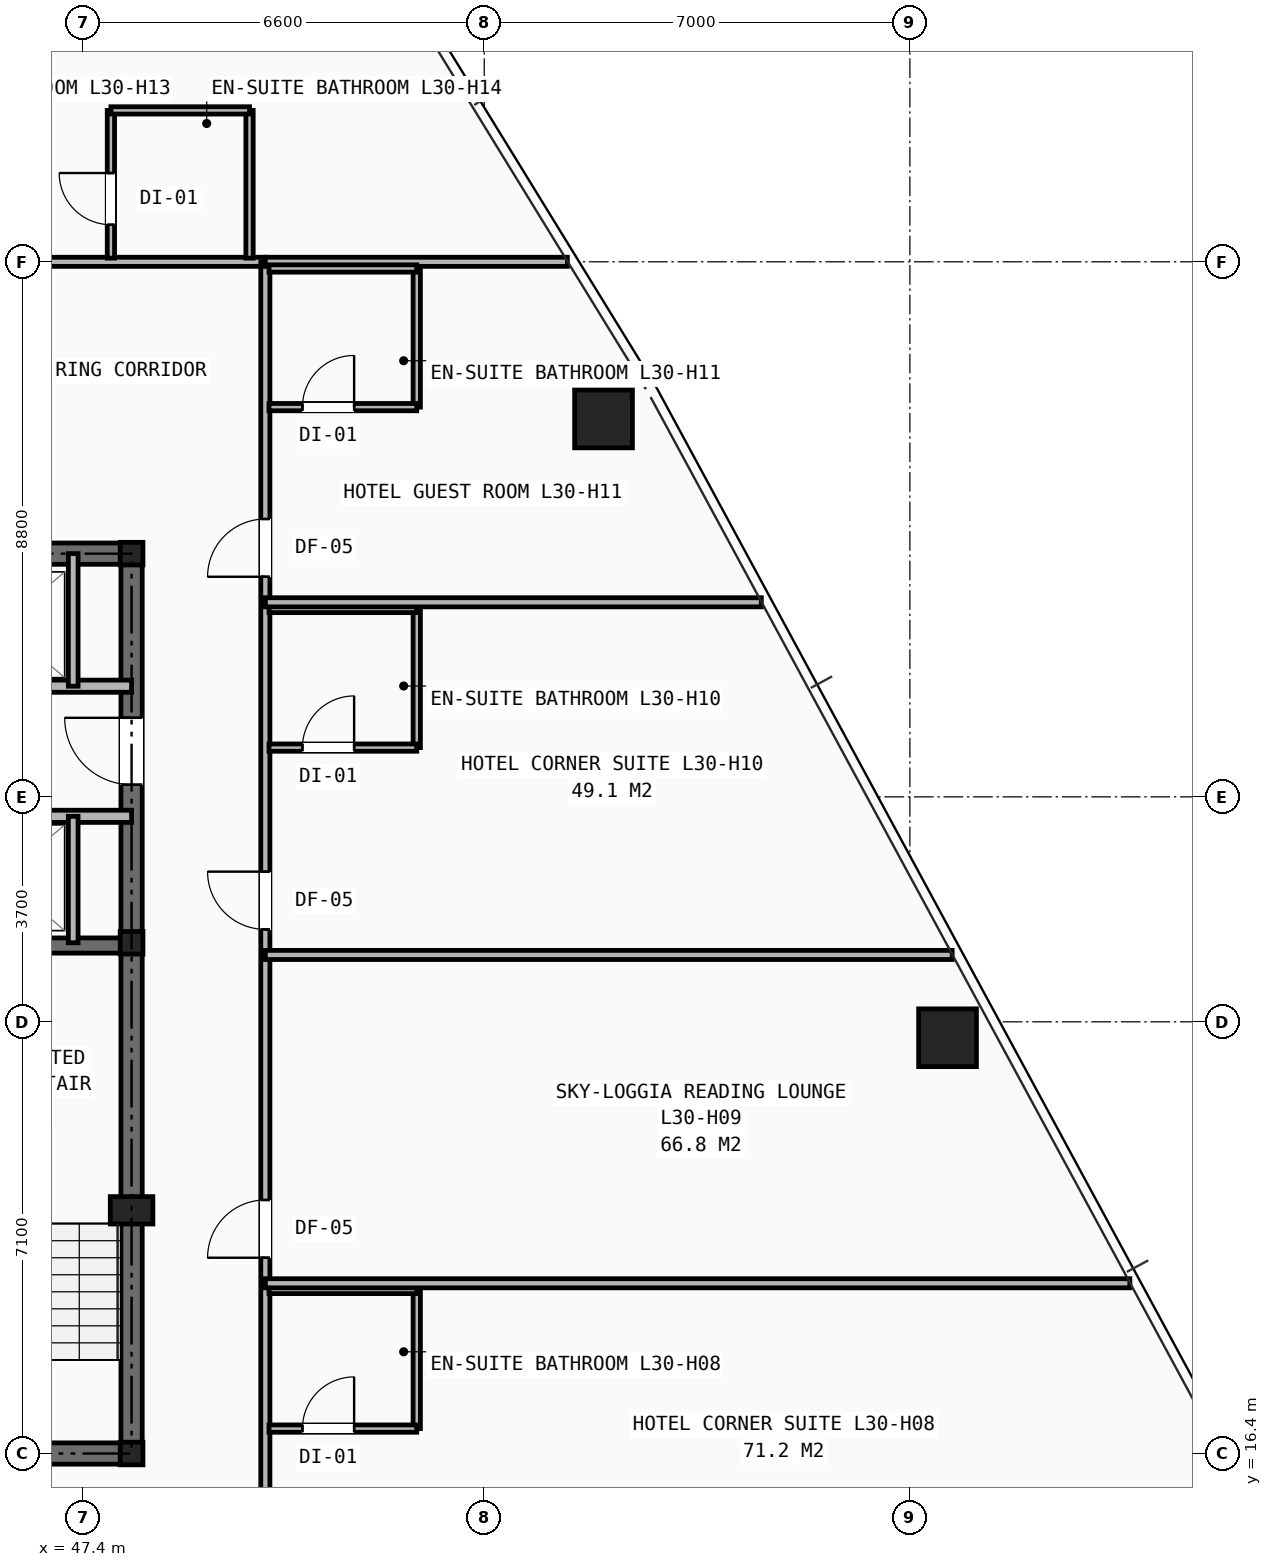
"""IFC4 building model, lengths in metres.
Left out: names, types, materials, properties, quantities, classifications, styles, units other than length and angle.
Written with IfcOpenShell. Run it as: python <this file> out.ifc"""

import sys

from ifc_helpers import new_model, si_unit, direction, frame, frame_2d, origin, origin_2d, place, context, subcontext, project, spatial, rectangle, hollow_rectangle, i_section, extrude, element, fill, save


model = new_model("IFC4")
c1 = context("Model", 3, precision=1e-05, world=origin(), true_north=direction((0.0, 1.0)))
c2 = subcontext(c1, "Body", "Model", "MODEL_VIEW")
j1 = project(units=[si_unit("LENGTHUNIT", "METRE"), si_unit("PLANEANGLEUNIT", "RADIAN")], contexts=[c1])
p1 = place(None, origin())
s1 = spatial("IfcSite", under=j1, at=p1, CompositionType="ELEMENT")
p2 = place(p1, origin())
s2 = spatial("IfcBuilding", under=s1, at=p2, CompositionType="ELEMENT")
p3 = place(p2, frame((0.0, 0.0, 105.4)))
s3 = spatial("IfcBuildingStorey", under=s2, at=p3, CompositionType="ELEMENT", Elevation=105.4)
for number, where, z_axis, x_axis in (
    (1, (48.2, 16.4, 0.0), (0.0, 0.0, 1.0), (1.0, 0.0, 0.0)),
    (2, (48.2, 24.8, 0.0), (0.0, 0.0, 1.0), (1.0, 0.0, 0.0)),
    (3, (48.2, 31.2, 0.0), (0.0, 0.0, 1.0), (1.0, 0.0, 0.0)),
):
    element("IfcColumn", number, at=place(p3, frame(where, z_axis=z_axis, x_axis=x_axis)), inside=s3, PredefinedType="COLUMN", context=c2, shape_type="SweptSolid", body=[
        extrude(i_section(OverallWidth=0.374, OverallDepth=0.372, WebThickness=0.016, FlangeThickness=0.026, at=origin_2d()), origin(), (0.0, 0.0, 1.0), 3.2),
    ])
p4 = place(p3, frame((48.2, 20.4, 0.0), z_axis=(0.0, 0.0, 1.0), x_axis=(1.0, 0.0, 0.0)))
e4 = element("IfcColumn", 4, at=p4, inside=s3, PredefinedType="PILASTER", context=c2, shape_type="SweptSolid", body=[
    extrude(rectangle(XDim=0.7, YDim=0.45, at=origin_2d()), origin(), (0.0, 0.0, 1.0), 3.2),
])
for number, where, z_axis, x_axis in (
    (5, (61.619, 23.238, 0.0), (0.0, 0.0, 1.0), (1.0, 0.0, 0.0)),
    (6, (55.962, 33.416, 0.0), (0.0, 0.0, 1.0), (1.0, 0.0, 0.0)),
):
    element("IfcColumn", number, at=place(p3, frame(where, z_axis=z_axis, x_axis=x_axis)), inside=s3, PredefinedType="COLUMN", context=c2, shape_type="SweptSolid", body=[
        extrude(hollow_rectangle(XDim=0.95, YDim=0.95, WallThickness=0.065, at=origin_2d()), origin(), (0.0, 0.0, 1.0), 3.2),
    ])
p5 = place(p3, frame((31.8, 16.4, 0.0), z_axis=(0.0, 0.0, 1.0), x_axis=(1.0, 0.0, 0.0)))
e7 = element("IfcWall", 7, at=p5, inside=s3, PredefinedType="SHEAR", context=c2, shape_type="SweptSolid", body=[
    extrude(rectangle(XDim=16.4, YDim=0.35, at=frame_2d((8.2, 0.0))), origin(), (0.0, 0.0, 1.0), 2.97),
])
p6 = place(p5, frame((7.75, 0.0, 0.0)))
e8 = element("IfcOpeningElement", 8, at=p6, cuts=e7, PredefinedType="OPENING", context=c2, shape_type="SweptSolid", body=[
    extrude(rectangle(XDim=0.9, YDim=2.1, at=frame_2d((0.45, 1.05))), frame((0.0, 0.185, 0.0), z_axis=(0.0, -1.0, 0.0), x_axis=(1.0, 0.0, 0.0)), (0.0, 0.0, 1.0), 0.37),
])
p7 = place(p5, frame((4.2, 0.0, 0.0)))
e9 = element("IfcOpeningElement", 9, at=p7, cuts=e7, PredefinedType="OPENING", context=c2, shape_type="SweptSolid", body=[
    extrude(rectangle(XDim=0.95, YDim=2.1, at=frame_2d((0.475, 1.05))), frame((0.0, 0.185, 0.0), z_axis=(0.0, -1.0, 0.0), x_axis=(1.0, 0.0, 0.0)), (0.0, 0.0, 1.0), 0.37),
])
p8 = place(p5, frame((10.6, 0.0, 0.0)))
e10 = element("IfcOpeningElement", 10, at=p8, cuts=e7, PredefinedType="OPENING", context=c2, shape_type="SweptSolid", body=[
    extrude(rectangle(XDim=0.95, YDim=2.1, at=frame_2d((0.475, 1.05))), frame((0.0, 0.185, 0.0), z_axis=(0.0, -1.0, 0.0), x_axis=(1.0, 0.0, 0.0)), (0.0, 0.0, 1.0), 0.37),
])
p9 = place(p3, frame((31.8, 31.2, 0.0), z_axis=(0.0, 0.0, 1.0), x_axis=(1.0, 0.0, 0.0)))
e11 = element("IfcWall", 11, at=p9, inside=s3, PredefinedType="SHEAR", context=c2, shape_type="SweptSolid", body=[
    extrude(rectangle(XDim=16.4, YDim=0.35, at=frame_2d((8.2, 0.0))), origin(), (0.0, 0.0, 1.0), 2.97),
])
p10 = place(p3, frame((48.2, 16.4, 0.0), z_axis=(0.0, 0.0, 1.0), x_axis=(0.0, 1.0, 0.0)))
e12 = element("IfcWall", 12, at=p10, inside=s3, PredefinedType="SHEAR", context=c2, shape_type="SweptSolid", body=[
    extrude(rectangle(XDim=14.8, YDim=0.35, at=frame_2d((7.4, 0.0))), origin(), (0.0, 0.0, 1.0), 2.97),
])
p11 = place(p10, frame((11.0, 0.0, 0.0)))
e13 = element("IfcOpeningElement", 13, at=p11, cuts=e12, PredefinedType="OPENING", context=c2, shape_type="SweptSolid", body=[
    extrude(rectangle(XDim=1.1, YDim=2.15, at=frame_2d((0.55, 1.075))), frame((0.0, 0.185, 0.0), z_axis=(0.0, -1.0, 0.0), x_axis=(1.0, 0.0, 0.0)), (0.0, 0.0, 1.0), 0.37),
])
p12 = place(p3, frame((44.955, 24.755, 0.0), z_axis=(0.0, 0.0, 1.0), x_axis=(1.0, 0.0, 0.0)))
e14 = element("IfcWall", 14, at=p12, inside=s3, PredefinedType="SHEAR", context=c2, shape_type="SweptSolid", body=[
    extrude(rectangle(XDim=3.245, YDim=0.25, at=frame_2d((1.623, 0.0))), origin(), (0.0, 0.0, 1.0), 2.97),
])
p13 = place(p3, frame((31.8, 29.02, 0.0), z_axis=(0.0, 0.0, 1.0), x_axis=(1.0, 0.0, 0.0)))
e15 = element("IfcWall", 15, at=p13, inside=s3, PredefinedType="SOLIDWALL", context=c2, shape_type="SweptSolid", body=[
    extrude(rectangle(XDim=16.4, YDim=0.2, at=frame_2d((8.2, 0.0))), origin(), (0.0, 0.0, 1.0), 2.421),
])
p14 = place(p13, frame((0.55, 0.0, 0.0)))
e16 = element("IfcOpeningElement", 16, at=p14, cuts=e15, PredefinedType="OPENING", context=c2, shape_type="SweptSolid", body=[
    extrude(rectangle(XDim=0.85, YDim=2.05, at=frame_2d((0.425, 1.025))), frame((0.0, 0.11, 0.0), z_axis=(0.0, -1.0, 0.0), x_axis=(1.0, 0.0, 0.0)), (0.0, 0.0, 1.0), 0.22),
])
p15 = place(p13, frame((2.55, 0.0, 0.0)))
e17 = element("IfcOpeningElement", 17, at=p15, cuts=e15, PredefinedType="OPENING", context=c2, shape_type="SweptSolid", body=[
    extrude(rectangle(XDim=1.1, YDim=2.15, at=frame_2d((0.55, 1.075))), frame((0.0, 0.11, 0.0), z_axis=(0.0, -1.0, 0.0), x_axis=(1.0, 0.0, 0.0)), (0.0, 0.0, 1.0), 0.22),
])
p16 = place(p13, frame((4.71, 0.0, 0.0)))
e18 = element("IfcOpeningElement", 18, at=p16, cuts=e15, PredefinedType="OPENING", context=c2, shape_type="SweptSolid", body=[
    extrude(rectangle(XDim=1.1, YDim=2.15, at=frame_2d((0.55, 1.075))), frame((0.0, 0.11, 0.0), z_axis=(0.0, -1.0, 0.0), x_axis=(1.0, 0.0, 0.0)), (0.0, 0.0, 1.0), 0.22),
])
p17 = place(p13, frame((6.87, 0.0, 0.0)))
e19 = element("IfcOpeningElement", 19, at=p17, cuts=e15, PredefinedType="OPENING", context=c2, shape_type="SweptSolid", body=[
    extrude(rectangle(XDim=1.1, YDim=2.15, at=frame_2d((0.55, 1.075))), frame((0.0, 0.11, 0.0), z_axis=(0.0, -1.0, 0.0), x_axis=(1.0, 0.0, 0.0)), (0.0, 0.0, 1.0), 0.22),
])
p18 = place(p13, frame((9.03, 0.0, 0.0)))
e20 = element("IfcOpeningElement", 20, at=p18, cuts=e15, PredefinedType="OPENING", context=c2, shape_type="SweptSolid", body=[
    extrude(rectangle(XDim=1.1, YDim=2.15, at=frame_2d((0.55, 1.075))), frame((0.0, 0.11, 0.0), z_axis=(0.0, -1.0, 0.0), x_axis=(1.0, 0.0, 0.0)), (0.0, 0.0, 1.0), 0.22),
])
p19 = place(p3, frame((33.82, 26.88, 0.0), z_axis=(0.0, 0.0, 1.0), x_axis=(1.0, 0.0, 0.0)))
e21 = element("IfcWall", 21, at=p19, inside=s3, PredefinedType="SOLIDWALL", context=c2, shape_type="SweptSolid", body=[
    extrude(rectangle(XDim=14.38, YDim=0.2, at=frame_2d((7.19, 0.0))), origin(), (0.0, 0.0, 1.0), 2.421),
])
p20 = place(p3, frame((47.24, 29.02, 0.0), z_axis=(0.0, 0.0, 1.0), x_axis=(0.0, 1.0, 0.0)))
e22 = element("IfcWall", 22, at=p20, inside=s3, PredefinedType="SOLIDWALL", context=c2, shape_type="SweptSolid", body=[
    extrude(rectangle(XDim=2.18, YDim=0.16, at=frame_2d((1.09, 0.0))), origin(), (0.0, 0.0, 1.0), 2.698),
])
p21 = place(p3, frame((47.24, 24.8, 0.0), z_axis=(0.0, 0.0, 1.0), x_axis=(0.0, 1.0, 0.0)))
e23 = element("IfcWall", 23, at=p21, inside=s3, PredefinedType="SOLIDWALL", context=c2, shape_type="SweptSolid", body=[
    extrude(rectangle(XDim=2.08, YDim=0.16, at=frame_2d((1.04, 0.0))), origin(), (0.0, 0.0, 1.0), 2.97),
])
p22 = place(p3, frame((40.75, 36.0, 0.0), z_axis=(0.0, 0.0, 1.0), x_axis=(1.0, 0.0, 0.0)))
e24 = element("IfcWall", 24, at=p22, inside=s3, PredefinedType="PARTITIONING", context=c2, shape_type="SweptSolid", body=[
    extrude(rectangle(XDim=9.65, YDim=0.15, at=frame_2d((4.825, 0.0))), origin(), (0.0, 0.0, 1.0), 2.503),
])
p23 = place(p22, frame((3.47, 0.0, 0.0)))
e25 = element("IfcOpeningElement", 25, at=p23, cuts=e24, PredefinedType="OPENING", context=c2, shape_type="SweptSolid", body=[
    extrude(rectangle(XDim=0.95, YDim=2.1, at=frame_2d((0.475, 1.05))), frame((0.0, 0.085, 0.0), z_axis=(0.0, -1.0, 0.0), x_axis=(1.0, 0.0, 0.0)), (0.0, 0.0, 1.0), 0.17),
])
p24 = place(p3, frame((50.4, 14.1, 0.0), z_axis=(0.0, 0.0, 1.0), x_axis=(0.0, 1.0, 0.0)))
e26 = element("IfcWall", 26, at=p24, inside=s3, PredefinedType="PARTITIONING", context=c2, shape_type="SweptSolid", body=[
    extrude(rectangle(XDim=21.9, YDim=0.15, at=frame_2d((10.95, 0.0))), origin(), (0.0, 0.0, 1.0), 2.421),
])
p25 = place(p24, frame((0.42, 0.0, 0.0)))
e27 = element("IfcOpeningElement", 27, at=p25, cuts=e26, PredefinedType="OPENING", context=c2, shape_type="SweptSolid", body=[
    extrude(rectangle(XDim=0.95, YDim=2.1, at=frame_2d((0.475, 1.05))), frame((0.0, 0.085, 0.0), z_axis=(0.0, -1.0, 0.0), x_axis=(1.0, 0.0, 0.0)), (0.0, 0.0, 1.0), 0.17),
])
p26 = place(p24, frame((5.52, 0.0, 0.0)))
e28 = element("IfcOpeningElement", 28, at=p26, cuts=e26, PredefinedType="OPENING", context=c2, shape_type="SweptSolid", body=[
    extrude(rectangle(XDim=0.95, YDim=2.1, at=frame_2d((0.475, 1.05))), frame((0.0, 0.085, 0.0), z_axis=(0.0, -1.0, 0.0), x_axis=(1.0, 0.0, 0.0)), (0.0, 0.0, 1.0), 0.17),
])
p27 = place(p24, frame((10.92, 0.0, 0.0)))
e29 = element("IfcOpeningElement", 29, at=p27, cuts=e26, PredefinedType="OPENING", context=c2, shape_type="SweptSolid", body=[
    extrude(rectangle(XDim=0.95, YDim=2.1, at=frame_2d((0.475, 1.05))), frame((0.0, 0.085, 0.0), z_axis=(0.0, -1.0, 0.0), x_axis=(1.0, 0.0, 0.0)), (0.0, 0.0, 1.0), 0.17),
])
p28 = place(p24, frame((16.72, 0.0, 0.0)))
e30 = element("IfcOpeningElement", 30, at=p28, cuts=e26, PredefinedType="OPENING", context=c2, shape_type="SweptSolid", body=[
    extrude(rectangle(XDim=0.95, YDim=2.1, at=frame_2d((0.475, 1.05))), frame((0.0, 0.085, 0.0), z_axis=(0.0, -1.0, 0.0), x_axis=(1.0, 0.0, 0.0)), (0.0, 0.0, 1.0), 0.17),
])
p29 = place(p3, frame((50.4, 36.0, 0.0), z_axis=(0.0, 0.0, 1.0), x_axis=(1.0, 0.0, 0.0)))
e31 = element("IfcWall", 31, at=p29, inside=s3, PredefinedType="PARTITIONING", context=c2, shape_type="SweptSolid", body=[
    extrude(rectangle(XDim=4.967, YDim=0.15, at=frame_2d((2.483, 0.0))), origin(), (0.0, 0.0, 1.0), 2.258),
])
p30 = place(p3, frame((52.89, 16.81, 0.0), z_axis=(0.0, 0.0, 1.0), x_axis=(0.0, 1.0, 0.0)))
e32 = element("IfcWall", 32, at=p30, inside=s3, PredefinedType="PARTITIONING", context=c2, shape_type="SweptSolid", body=[
    extrude(rectangle(XDim=2.28, YDim=0.12, at=frame_2d((1.14, 0.0))), origin(), (0.0, 0.0, 1.0), 2.97),
])
p31 = place(p3, frame((50.46, 16.81, 0.0), z_axis=(0.0, 0.0, 1.0), x_axis=(1.0, 0.0, 0.0)))
e33 = element("IfcWall", 33, at=p31, inside=s3, PredefinedType="PARTITIONING", context=c2, shape_type="SweptSolid", body=[
    extrude(rectangle(XDim=2.43, YDim=0.12, at=frame_2d((1.215, 0.0))), origin(), (0.0, 0.0, 1.0), 2.97),
])
p32 = place(p31, frame((0.55, 0.0, 0.0)))
e34 = element("IfcOpeningElement", 34, at=p32, cuts=e33, PredefinedType="OPENING", context=c2, shape_type="SweptSolid", body=[
    extrude(rectangle(XDim=0.85, YDim=2.05, at=frame_2d((0.425, 1.025))), frame((0.0, 0.07, 0.0), z_axis=(0.0, -1.0, 0.0), x_axis=(1.0, 0.0, 0.0)), (0.0, 0.0, 1.0), 0.14),
])
p33 = place(p3, frame((50.46, 19.09, 0.0), z_axis=(0.0, 0.0, 1.0), x_axis=(1.0, 0.0, 0.0)))
e35 = element("IfcWall", 35, at=p33, inside=s3, PredefinedType="PARTITIONING", context=c2, shape_type="SweptSolid", body=[
    extrude(rectangle(XDim=2.43, YDim=0.12, at=frame_2d((1.215, 0.0))), origin(), (0.0, 0.0, 1.0), 2.97),
])
p34 = place(p3, frame((50.4, 19.2, 0.0), z_axis=(0.0, 0.0, 1.0), x_axis=(1.0, 0.0, 0.0)))
e36 = element("IfcWall", 36, at=p34, inside=s3, PredefinedType="PARTITIONING", context=c2, shape_type="SweptSolid", body=[
    extrude(rectangle(XDim=14.218, YDim=0.15, at=frame_2d((7.109, 0.0))), origin(), (0.0, 0.0, 1.0), 2.258),
])
p35 = place(p3, frame((50.4, 24.6, 0.0), z_axis=(0.0, 0.0, 1.0), x_axis=(1.0, 0.0, 0.0)))
e37 = element("IfcWall", 37, at=p35, inside=s3, PredefinedType="PARTITIONING", context=c2, shape_type="SweptSolid", body=[
    extrude(rectangle(XDim=11.295, YDim=0.15, at=frame_2d((5.648, 0.0))), origin(), (0.0, 0.0, 1.0), 2.258),
])
p36 = place(p3, frame((52.89, 28.01, 0.0), z_axis=(0.0, 0.0, 1.0), x_axis=(0.0, 1.0, 0.0)))
e38 = element("IfcWall", 38, at=p36, inside=s3, PredefinedType="PARTITIONING", context=c2, shape_type="SweptSolid", body=[
    extrude(rectangle(XDim=2.28, YDim=0.12, at=frame_2d((1.14, 0.0))), origin(), (0.0, 0.0, 1.0), 2.97),
])
p37 = place(p3, frame((50.46, 28.01, 0.0), z_axis=(0.0, 0.0, 1.0), x_axis=(1.0, 0.0, 0.0)))
e39 = element("IfcWall", 39, at=p37, inside=s3, PredefinedType="PARTITIONING", context=c2, shape_type="SweptSolid", body=[
    extrude(rectangle(XDim=2.43, YDim=0.12, at=frame_2d((1.215, 0.0))), origin(), (0.0, 0.0, 1.0), 2.97),
])
p38 = place(p37, frame((0.55, 0.0, 0.0)))
e40 = element("IfcOpeningElement", 40, at=p38, cuts=e39, PredefinedType="OPENING", context=c2, shape_type="SweptSolid", body=[
    extrude(rectangle(XDim=0.85, YDim=2.05, at=frame_2d((0.425, 1.025))), frame((0.0, 0.07, 0.0), z_axis=(0.0, -1.0, 0.0), x_axis=(1.0, 0.0, 0.0)), (0.0, 0.0, 1.0), 0.14),
])
p39 = place(p3, frame((50.46, 30.29, 0.0), z_axis=(0.0, 0.0, 1.0), x_axis=(1.0, 0.0, 0.0)))
e41 = element("IfcWall", 41, at=p39, inside=s3, PredefinedType="PARTITIONING", context=c2, shape_type="SweptSolid", body=[
    extrude(rectangle(XDim=2.43, YDim=0.12, at=frame_2d((1.215, 0.0))), origin(), (0.0, 0.0, 1.0), 2.97),
])
p40 = place(p3, frame((50.4, 30.4, 0.0), z_axis=(0.0, 0.0, 1.0), x_axis=(1.0, 0.0, 0.0)))
e42 = element("IfcWall", 42, at=p40, inside=s3, PredefinedType="PARTITIONING", context=c2, shape_type="SweptSolid", body=[
    extrude(rectangle(XDim=8.156, YDim=0.15, at=frame_2d((4.078, 0.0))), origin(), (0.0, 0.0, 1.0), 2.258),
])
p41 = place(p3, frame((52.89, 33.61, 0.0), z_axis=(0.0, 0.0, 1.0), x_axis=(0.0, 1.0, 0.0)))
e43 = element("IfcWall", 43, at=p41, inside=s3, PredefinedType="PARTITIONING", context=c2, shape_type="SweptSolid", body=[
    extrude(rectangle(XDim=2.28, YDim=0.12, at=frame_2d((1.14, 0.0))), origin(), (0.0, 0.0, 1.0), 2.97),
])
p42 = place(p3, frame((50.46, 33.61, 0.0), z_axis=(0.0, 0.0, 1.0), x_axis=(1.0, 0.0, 0.0)))
e44 = element("IfcWall", 44, at=p42, inside=s3, PredefinedType="PARTITIONING", context=c2, shape_type="SweptSolid", body=[
    extrude(rectangle(XDim=2.43, YDim=0.12, at=frame_2d((1.215, 0.0))), origin(), (0.0, 0.0, 1.0), 2.503),
])
p43 = place(p42, frame((0.55, 0.0, 0.0)))
e45 = element("IfcOpeningElement", 45, at=p43, cuts=e44, PredefinedType="OPENING", context=c2, shape_type="SweptSolid", body=[
    extrude(rectangle(XDim=0.85, YDim=2.05, at=frame_2d((0.425, 1.025))), frame((0.0, 0.07, 0.0), z_axis=(0.0, -1.0, 0.0), x_axis=(1.0, 0.0, 0.0)), (0.0, 0.0, 1.0), 0.14),
])
p44 = place(p3, frame((50.46, 35.89, 0.0), z_axis=(0.0, 0.0, 1.0), x_axis=(1.0, 0.0, 0.0)))
e46 = element("IfcWall", 46, at=p44, inside=s3, PredefinedType="PARTITIONING", context=c2, shape_type="SweptSolid", body=[
    extrude(rectangle(XDim=2.43, YDim=0.12, at=frame_2d((1.215, 0.0))), origin(), (0.0, 0.0, 1.0), 2.97),
])
p45 = place(p3, frame((47.86, 36.06, 0.0), z_axis=(0.0, 0.0, 1.0), x_axis=(0.0, 1.0, 0.0)))
e47 = element("IfcWall", 47, at=p45, inside=s3, PredefinedType="PARTITIONING", context=c2, shape_type="SweptSolid", body=[
    extrude(rectangle(XDim=2.43, YDim=0.12, at=frame_2d((1.215, 0.0))), origin(), (0.0, 0.0, 1.0), 2.503),
])
p46 = place(p45, frame((0.55, 0.0, 0.0)))
e48 = element("IfcOpeningElement", 48, at=p46, cuts=e47, PredefinedType="OPENING", context=c2, shape_type="SweptSolid", body=[
    extrude(rectangle(XDim=0.85, YDim=2.05, at=frame_2d((0.425, 1.025))), frame((0.0, 0.07, 0.0), z_axis=(0.0, -1.0, 0.0), x_axis=(1.0, 0.0, 0.0)), (0.0, 0.0, 1.0), 0.14),
])
p47 = place(p3, frame((50.14, 36.06, 0.0), z_axis=(0.0, 0.0, 1.0), x_axis=(0.0, 1.0, 0.0)))
e49 = element("IfcWall", 49, at=p47, inside=s3, PredefinedType="PARTITIONING", context=c2, shape_type="SweptSolid", body=[
    extrude(rectangle(XDim=2.43, YDim=0.12, at=frame_2d((1.215, 0.0))), origin(), (0.0, 0.0, 1.0), 2.97),
])
p48 = place(p3, frame((47.86, 38.49, 0.0), z_axis=(0.0, 0.0, 1.0), x_axis=(1.0, 0.0, 0.0)))
e50 = element("IfcWall", 50, at=p48, inside=s3, PredefinedType="PARTITIONING", context=c2, shape_type="SweptSolid", body=[
    extrude(rectangle(XDim=2.28, YDim=0.12, at=frame_2d((1.14, 0.0))), origin(), (0.0, 0.0, 1.0), 2.503),
])
p49 = place(p11, origin())
e51 = element("IfcDoor", 51, at=p49, inside=s3, OperationType="SINGLE_SWING_RIGHT", PredefinedType="DOOR", context=c2, shape_type="SweptSolid", body=[
    extrude(rectangle(XDim=1.1, YDim=2.15, at=frame_2d((0.55, 1.075))), frame((0.0, 0.025, 0.0), z_axis=(0.0, -1.0, 0.0), x_axis=(1.0, 0.0, 0.0)), (0.0, 0.0, 1.0), 0.05),
])
fill(e13, e51)
p50 = place(p32, origin())
e52 = element("IfcDoor", 52, at=p50, inside=s3, OperationType="SINGLE_SWING_RIGHT", PredefinedType="DOOR", context=c2, shape_type="SweptSolid", body=[
    extrude(rectangle(XDim=0.85, YDim=2.05, at=frame_2d((0.425, 1.025))), frame((0.0, 0.025, 0.0), z_axis=(0.0, -1.0, 0.0), x_axis=(1.0, 0.0, 0.0)), (0.0, 0.0, 1.0), 0.05),
])
fill(e34, e52)
p51 = place(p26, origin())
e53 = element("IfcDoor", 53, at=p51, inside=s3, OperationType="SINGLE_SWING_LEFT", PredefinedType="DOOR", context=c2, shape_type="SweptSolid", body=[
    extrude(rectangle(XDim=0.95, YDim=2.1, at=frame_2d((0.475, 1.05))), frame((0.0, 0.025, 0.0), z_axis=(0.0, -1.0, 0.0), x_axis=(1.0, 0.0, 0.0)), (0.0, 0.0, 1.0), 0.05),
])
fill(e28, e53)
p52 = place(p27, origin())
e54 = element("IfcDoor", 54, at=p52, inside=s3, OperationType="SINGLE_SWING_RIGHT", PredefinedType="DOOR", context=c2, shape_type="SweptSolid", body=[
    extrude(rectangle(XDim=0.95, YDim=2.1, at=frame_2d((0.475, 1.05))), frame((0.0, 0.025, 0.0), z_axis=(0.0, -1.0, 0.0), x_axis=(1.0, 0.0, 0.0)), (0.0, 0.0, 1.0), 0.05),
])
fill(e29, e54)
p53 = place(p38, origin())
e55 = element("IfcDoor", 55, at=p53, inside=s3, OperationType="SINGLE_SWING_RIGHT", PredefinedType="DOOR", context=c2, shape_type="SweptSolid", body=[
    extrude(rectangle(XDim=0.85, YDim=2.05, at=frame_2d((0.425, 1.025))), frame((0.0, 0.025, 0.0), z_axis=(0.0, -1.0, 0.0), x_axis=(1.0, 0.0, 0.0)), (0.0, 0.0, 1.0), 0.05),
])
fill(e40, e55)
p54 = place(p28, origin())
e56 = element("IfcDoor", 56, at=p54, inside=s3, OperationType="SINGLE_SWING_LEFT", PredefinedType="DOOR", context=c2, shape_type="SweptSolid", body=[
    extrude(rectangle(XDim=0.95, YDim=2.1, at=frame_2d((0.475, 1.05))), frame((0.0, 0.025, 0.0), z_axis=(0.0, -1.0, 0.0), x_axis=(1.0, 0.0, 0.0)), (0.0, 0.0, 1.0), 0.05),
])
fill(e30, e56)
p55 = place(p43, origin())
e57 = element("IfcDoor", 57, at=p55, inside=s3, OperationType="SINGLE_SWING_RIGHT", PredefinedType="DOOR", context=c2, shape_type="SweptSolid", body=[
    extrude(rectangle(XDim=0.85, YDim=2.05, at=frame_2d((0.425, 1.025))), frame((0.0, 0.025, 0.0), z_axis=(0.0, -1.0, 0.0), x_axis=(1.0, 0.0, 0.0)), (0.0, 0.0, 1.0), 0.05),
])
fill(e45, e57)
p56 = place(p46, origin())
e58 = element("IfcDoor", 58, at=p56, inside=s3, OperationType="SINGLE_SWING_RIGHT", PredefinedType="DOOR", context=c2, shape_type="SweptSolid", body=[
    extrude(rectangle(XDim=0.85, YDim=2.05, at=frame_2d((0.425, 1.025))), frame((0.0, 0.025, 0.0), z_axis=(0.0, -1.0, 0.0), x_axis=(1.0, 0.0, 0.0)), (0.0, 0.0, 1.0), 0.05),
])
fill(e48, e58)
save(model, sys.argv[1])
